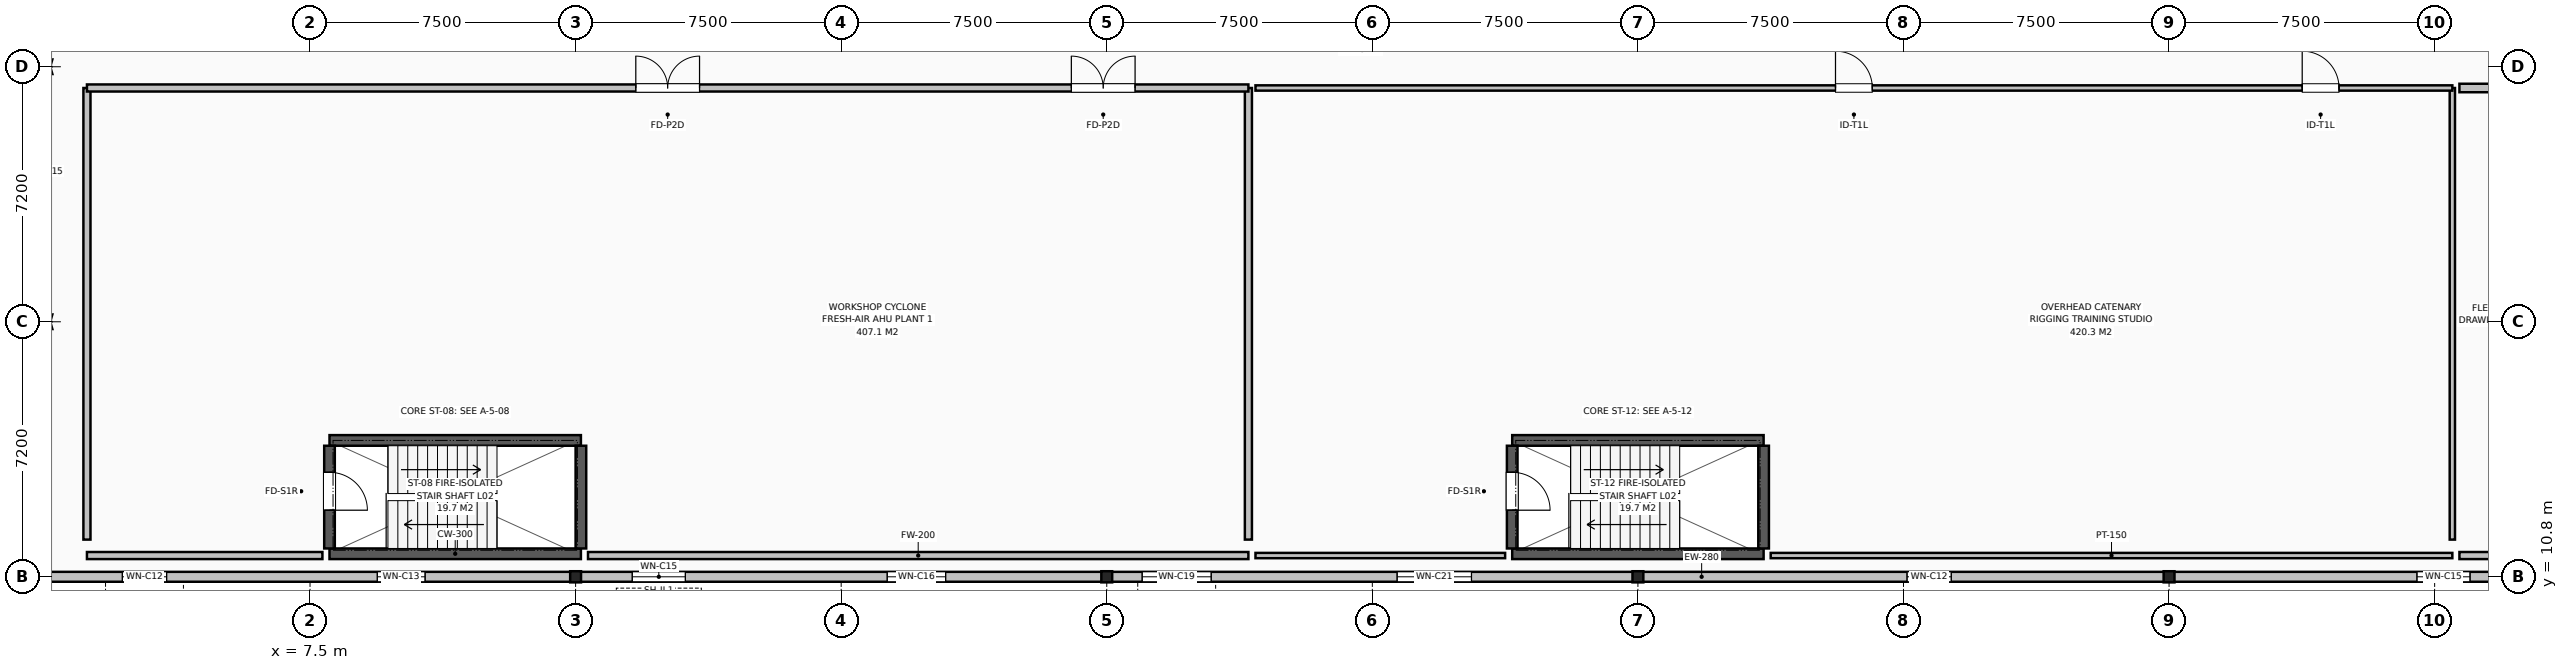
"""IFC4 building model, lengths in metres.
Left out: names, types, materials, properties, quantities, classifications, styles, units other than length and angle.
Written with IfcOpenShell. Run it as: python <this file> out.ifc"""

import sys

from ifc_helpers import new_model, si_unit, direction, frame, frame_2d, origin, origin_2d, place, context, subcontext, project, spatial, rectangle, i_section, extrude, element, fill, save


model = new_model("IFC4")
c1 = context("Model", 3, precision=1e-05, world=origin(), true_north=direction((0.0, 1.0)))
c2 = subcontext(c1, "Body", "Model", "MODEL_VIEW")
j1 = project(units=[si_unit("LENGTHUNIT", "METRE"), si_unit("PLANEANGLEUNIT", "RADIAN")], contexts=[c1])
p1 = place(None, origin())
s1 = spatial("IfcSite", under=j1, at=p1, CompositionType="ELEMENT")
p2 = place(p1, origin())
s2 = spatial("IfcBuilding", under=s1, at=p2, CompositionType="ELEMENT")
p3 = place(p2, frame((0.0, 0.0, 9.0)))
s3 = spatial("IfcBuildingStorey", under=s2, at=p3, CompositionType="ELEMENT", Elevation=9.0)
for number, where, z_axis, x_axis in (
    (1, (15.0, 10.8, 0.0), (0.0, 0.0, 1.0), (1.0, 0.0, 0.0)),
    (2, (30.0, 10.8, 0.0), (0.0, 0.0, 1.0), (1.0, 0.0, 0.0)),
    (3, (45.0, 10.8, 0.0), (0.0, 0.0, 1.0), (1.0, 0.0, 0.0)),
    (4, (60.0, 10.8, 0.0), (0.0, 0.0, 1.0), (1.0, 0.0, 0.0)),
):
    element("IfcColumn", number, at=place(p3, frame(where, z_axis=z_axis, x_axis=x_axis)), inside=s3, PredefinedType="COLUMN", context=c2, shape_type="SweptSolid", body=[
        extrude(i_section(OverallWidth=0.307, OverallDepth=0.315, WebThickness=0.012, FlangeThickness=0.019, at=origin_2d()), origin(), (0.0, 0.0, 1.0), 4.2),
    ])
p4 = place(p3, frame((0.0, 10.8, 0.0), z_axis=(0.0, 0.0, 1.0), x_axis=(1.0, 0.0, 0.0)))
e5 = element("IfcWall", 5, at=p4, inside=s3, PredefinedType="SOLIDWALL", context=c2, shape_type="SweptSolid", body=[
    extrude(rectangle(XDim=93.6, YDim=0.28, at=frame_2d((46.8, 0.0))), origin(), (0.0, 0.0, 1.0), 3.058),
])
p5 = place(p4, frame((2.2, 0.0, 0.78)))
e6 = element("IfcOpeningElement", 6, at=p5, cuts=e5, PredefinedType="OPENING", context=c2, shape_type="SweptSolid", body=[
    extrude(rectangle(XDim=1.25, YDim=1.7, at=frame_2d((0.625, 0.85))), frame((0.0, 0.15, 0.0), z_axis=(0.0, -1.0, 0.0), x_axis=(1.0, 0.0, 0.0)), (0.0, 0.0, 1.0), 0.3),
])
p6 = place(p4, frame((9.4, 0.0, 0.78)))
e7 = element("IfcOpeningElement", 7, at=p6, cuts=e5, PredefinedType="OPENING", context=c2, shape_type="SweptSolid", body=[
    extrude(rectangle(XDim=1.35, YDim=1.75, at=frame_2d((0.675, 0.875))), frame((0.0, 0.15, 0.0), z_axis=(0.0, -1.0, 0.0), x_axis=(1.0, 0.0, 0.0)), (0.0, 0.0, 1.0), 0.3),
])
p7 = place(p4, frame((16.6, 0.0, 0.78)))
e8 = element("IfcOpeningElement", 8, at=p7, cuts=e5, PredefinedType="OPENING", context=c2, shape_type="SweptSolid", body=[
    extrude(rectangle(XDim=1.5, YDim=1.75, at=frame_2d((0.75, 0.875))), frame((0.0, 0.15, 0.0), z_axis=(0.0, -1.0, 0.0), x_axis=(1.0, 0.0, 0.0)), (0.0, 0.0, 1.0), 0.3),
])
p8 = place(p4, frame((23.8, 0.0, 0.78)))
e9 = element("IfcOpeningElement", 9, at=p8, cuts=e5, PredefinedType="OPENING", context=c2, shape_type="SweptSolid", body=[
    extrude(rectangle(XDim=1.65, YDim=1.8, at=frame_2d((0.825, 0.9))), frame((0.0, 0.15, 0.0), z_axis=(0.0, -1.0, 0.0), x_axis=(1.0, 0.0, 0.0)), (0.0, 0.0, 1.0), 0.3),
])
p9 = place(p4, frame((31.0, 0.0, 0.78)))
e10 = element("IfcOpeningElement", 10, at=p9, cuts=e5, PredefinedType="OPENING", context=c2, shape_type="SweptSolid", body=[
    extrude(rectangle(XDim=1.95, YDim=1.8, at=frame_2d((0.975, 0.9))), frame((0.0, 0.15, 0.0), z_axis=(0.0, -1.0, 0.0), x_axis=(1.0, 0.0, 0.0)), (0.0, 0.0, 1.0), 0.3),
])
p10 = place(p4, frame((38.2, 0.0, 0.78)))
e11 = element("IfcOpeningElement", 11, at=p10, cuts=e5, PredefinedType="OPENING", context=c2, shape_type="SweptSolid", body=[
    extrude(rectangle(XDim=2.1, YDim=1.8, at=frame_2d((1.05, 0.9))), frame((0.0, 0.15, 0.0), z_axis=(0.0, -1.0, 0.0), x_axis=(1.0, 0.0, 0.0)), (0.0, 0.0, 1.0), 0.3),
])
p11 = place(p4, frame((52.6, 0.0, 0.78)))
e12 = element("IfcOpeningElement", 12, at=p11, cuts=e5, PredefinedType="OPENING", context=c2, shape_type="SweptSolid", body=[
    extrude(rectangle(XDim=1.25, YDim=1.7, at=frame_2d((0.625, 0.85))), frame((0.0, 0.15, 0.0), z_axis=(0.0, -1.0, 0.0), x_axis=(1.0, 0.0, 0.0)), (0.0, 0.0, 1.0), 0.3),
])
p12 = place(p4, frame((67.0, 0.0, 0.78)))
e13 = element("IfcOpeningElement", 13, at=p12, cuts=e5, PredefinedType="OPENING", context=c2, shape_type="SweptSolid", body=[
    extrude(rectangle(XDim=1.5, YDim=1.75, at=frame_2d((0.75, 0.875))), frame((0.0, 0.15, 0.0), z_axis=(0.0, -1.0, 0.0), x_axis=(1.0, 0.0, 0.0)), (0.0, 0.0, 1.0), 0.3),
])
p13 = place(p4, frame((81.4, 0.0, 0.78)))
e14 = element("IfcOpeningElement", 14, at=p13, cuts=e5, PredefinedType="OPENING", context=c2, shape_type="SweptSolid", body=[
    extrude(rectangle(XDim=1.95, YDim=1.8, at=frame_2d((0.975, 0.9))), frame((0.0, 0.15, 0.0), z_axis=(0.0, -1.0, 0.0), x_axis=(1.0, 0.0, 0.0)), (0.0, 0.0, 1.0), 0.3),
])
for number, where, z_axis, x_axis in (
    (15, (8.05, 11.45, 0.0), (0.0, 0.0, 1.0), (1.0, 0.0, 0.0)),
    (16, (15.15, 14.65, 0.0), (0.0, 0.0, 1.0), (-1.0, 0.0, 0.0)),
):
    element("IfcWall", number, at=place(p3, frame(where, z_axis=z_axis, x_axis=x_axis)), inside=s3, PredefinedType="SHEAR", context=c2, shape_type="SweptSolid", body=[
        extrude(rectangle(XDim=7.1, YDim=0.3, at=frame_2d((3.55, 0.0))), origin(), (0.0, 0.0, 1.0), 3.45),
    ])
p14 = place(p3, frame((15.15, 11.6, 0.0), z_axis=(0.0, 0.0, 1.0), x_axis=(0.0, 1.0, 0.0)))
e17 = element("IfcWall", 17, at=p14, inside=s3, PredefinedType="SHEAR", context=c2, shape_type="SweptSolid", body=[
    extrude(rectangle(XDim=2.9, YDim=0.3, at=frame_2d((1.45, 0.0))), origin(), (0.0, 0.0, 1.0), 3.45),
])
p15 = place(p3, frame((8.05, 14.5, 0.0), z_axis=(0.0, 0.0, 1.0), x_axis=(0.0, -1.0, 0.0)))
e18 = element("IfcWall", 18, at=p15, inside=s3, PredefinedType="SHEAR", context=c2, shape_type="SweptSolid", body=[
    extrude(rectangle(XDim=2.9, YDim=0.3, at=frame_2d((1.45, 0.0))), origin(), (0.0, 0.0, 1.0), 3.45),
])
p16 = place(p15, frame((0.75, 0.0, 0.0)))
e19 = element("IfcOpeningElement", 19, at=p16, cuts=e18, PredefinedType="OPENING", context=c2, shape_type="SweptSolid", body=[
    extrude(rectangle(XDim=1.07, YDim=2.15, at=frame_2d((0.535, 1.075))), frame((0.0, 0.16, 0.0), z_axis=(0.0, -1.0, 0.0), x_axis=(1.0, 0.0, 0.0)), (0.0, 0.0, 1.0), 0.32),
])
for number, where, z_axis, x_axis in (
    (20, (41.45, 11.45, 0.0), (0.0, 0.0, 1.0), (1.0, 0.0, 0.0)),
    (21, (48.55, 14.65, 0.0), (0.0, 0.0, 1.0), (-1.0, 0.0, 0.0)),
):
    element("IfcWall", number, at=place(p3, frame(where, z_axis=z_axis, x_axis=x_axis)), inside=s3, PredefinedType="SHEAR", context=c2, shape_type="SweptSolid", body=[
        extrude(rectangle(XDim=7.1, YDim=0.3, at=frame_2d((3.55, 0.0))), origin(), (0.0, 0.0, 1.0), 3.45),
    ])
p17 = place(p3, frame((48.55, 11.6, 0.0), z_axis=(0.0, 0.0, 1.0), x_axis=(0.0, 1.0, 0.0)))
e22 = element("IfcWall", 22, at=p17, inside=s3, PredefinedType="SHEAR", context=c2, shape_type="SweptSolid", body=[
    extrude(rectangle(XDim=2.9, YDim=0.3, at=frame_2d((1.45, 0.0))), origin(), (0.0, 0.0, 1.0), 3.45),
])
p18 = place(p3, frame((41.45, 14.5, 0.0), z_axis=(0.0, 0.0, 1.0), x_axis=(0.0, -1.0, 0.0)))
e23 = element("IfcWall", 23, at=p18, inside=s3, PredefinedType="SHEAR", context=c2, shape_type="SweptSolid", body=[
    extrude(rectangle(XDim=2.9, YDim=0.3, at=frame_2d((1.45, 0.0))), origin(), (0.0, 0.0, 1.0), 3.45),
])
p19 = place(p18, frame((0.75, 0.0, 0.0)))
e24 = element("IfcOpeningElement", 24, at=p19, cuts=e23, PredefinedType="OPENING", context=c2, shape_type="SweptSolid", body=[
    extrude(rectangle(XDim=1.07, YDim=2.15, at=frame_2d((0.535, 1.075))), frame((0.0, 0.16, 0.0), z_axis=(0.0, -1.0, 0.0), x_axis=(1.0, 0.0, 0.0)), (0.0, 0.0, 1.0), 0.32),
])
p20 = place(p3, frame((34.0, 11.4, 0.0), z_axis=(0.0, 0.0, 1.0), x_axis=(-1.0, 0.0, 0.0)))
e25 = element("IfcWall", 25, at=p20, inside=s3, PredefinedType="SOLIDWALL", context=c2, shape_type="SweptSolid", body=[
    extrude(rectangle(XDim=18.65, YDim=0.2, at=frame_2d((9.325, 0.0))), origin(), (0.0, 0.0, 1.0), 3.287),
])
p21 = place(p3, frame((7.85, 11.4, 0.0), z_axis=(0.0, 0.0, 1.0), x_axis=(-1.0, 0.0, 0.0)))
e26 = element("IfcWall", 26, at=p21, inside=s3, PredefinedType="SOLIDWALL", context=c2, shape_type="SweptSolid", body=[
    extrude(rectangle(XDim=6.65, YDim=0.2, at=frame_2d((3.325, 0.0))), origin(), (0.0, 0.0, 1.0), 3.6),
])
for number, where, z_axis, x_axis in (
    (27, (34.0, 11.85, 0.0), (0.0, 0.0, 1.0), (0.0, 1.0, 0.0)),
    (28, (1.2, 24.6, 0.0), (0.0, 0.0, 1.0), (0.0, -1.0, 0.0)),
):
    element("IfcWall", number, at=place(p3, frame(where, z_axis=z_axis, x_axis=x_axis)), inside=s3, PredefinedType="SOLIDWALL", context=c2, shape_type="SweptSolid", body=[
        extrude(rectangle(XDim=12.75, YDim=0.2, at=frame_2d((6.375, 0.0))), origin(), (0.0, 0.0, 1.0), 3.6),
    ])
p22 = place(p3, frame((1.2, 24.6, 0.0), z_axis=(0.0, 0.0, 1.0), x_axis=(1.0, 0.0, 0.0)))
e29 = element("IfcWall", 29, at=p22, inside=s3, PredefinedType="SOLIDWALL", context=c2, shape_type="SweptSolid", body=[
    extrude(rectangle(XDim=32.8, YDim=0.2, at=frame_2d((16.4, 0.0))), origin(), (0.0, 0.0, 1.0), 3.287),
])
p23 = place(p22, frame((15.5, 0.0, 0.0)))
e30 = element("IfcOpeningElement", 30, at=p23, cuts=e29, PredefinedType="OPENING", context=c2, shape_type="SweptSolid", body=[
    extrude(rectangle(XDim=1.8, YDim=2.2, at=frame_2d((0.9, 1.1))), frame((0.0, 0.11, 0.0), z_axis=(0.0, -1.0, 0.0), x_axis=(1.0, 0.0, 0.0)), (0.0, 0.0, 1.0), 0.22),
])
p24 = place(p22, frame((27.8, 0.0, 0.0)))
e31 = element("IfcOpeningElement", 31, at=p24, cuts=e29, PredefinedType="OPENING", context=c2, shape_type="SweptSolid", body=[
    extrude(rectangle(XDim=1.8, YDim=2.2, at=frame_2d((0.9, 1.1))), frame((0.0, 0.11, 0.0), z_axis=(0.0, -1.0, 0.0), x_axis=(1.0, 0.0, 0.0)), (0.0, 0.0, 1.0), 0.22),
])
p25 = place(p3, frame((68.0, 11.4, 0.0), z_axis=(0.0, 0.0, 1.0), x_axis=(-1.0, 0.0, 0.0)))
e32 = element("IfcWall", 32, at=p25, inside=s3, PredefinedType="PARTITIONING", context=c2, shape_type="SweptSolid", body=[
    extrude(rectangle(XDim=19.25, YDim=0.15, at=frame_2d((9.625, 0.0))), origin(), (0.0, 0.0, 1.0), 3.235),
])
p26 = place(p3, frame((41.25, 11.4, 0.0), z_axis=(0.0, 0.0, 1.0), x_axis=(-1.0, 0.0, 0.0)))
e33 = element("IfcWall", 33, at=p26, inside=s3, PredefinedType="PARTITIONING", context=c2, shape_type="SweptSolid", body=[
    extrude(rectangle(XDim=7.05, YDim=0.15, at=frame_2d((3.525, 0.0))), origin(), (0.0, 0.0, 1.0), 3.6),
])
p27 = place(p3, frame((68.0, 11.85, 0.0), z_axis=(0.0, 0.0, 1.0), x_axis=(0.0, 1.0, 0.0)))
e34 = element("IfcWall", 34, at=p27, inside=s3, PredefinedType="PARTITIONING", context=c2, shape_type="SweptSolid", body=[
    extrude(rectangle(XDim=12.75, YDim=0.15, at=frame_2d((6.375, 0.0))), origin(), (0.0, 0.0, 1.0), 3.6),
])
p28 = place(p3, frame((34.2, 24.6, 0.0), z_axis=(0.0, 0.0, 1.0), x_axis=(1.0, 0.0, 0.0)))
e35 = element("IfcWall", 35, at=p28, inside=s3, PredefinedType="PARTITIONING", context=c2, shape_type="SweptSolid", body=[
    extrude(rectangle(XDim=33.8, YDim=0.15, at=frame_2d((16.9, 0.0))), origin(), (0.0, 0.0, 1.0), 3.235),
])
p29 = place(p28, frame((16.38, 0.0, 0.0)))
e36 = element("IfcOpeningElement", 36, at=p29, cuts=e35, PredefinedType="OPENING", context=c2, shape_type="SweptSolid", body=[
    extrude(rectangle(XDim=1.04, YDim=2.15, at=frame_2d((0.52, 1.075))), frame((0.0, 0.085, 0.0), z_axis=(0.0, -1.0, 0.0), x_axis=(1.0, 0.0, 0.0)), (0.0, 0.0, 1.0), 0.17),
])
p30 = place(p28, frame((29.56, 0.0, 0.0)))
e37 = element("IfcOpeningElement", 37, at=p30, cuts=e35, PredefinedType="OPENING", context=c2, shape_type="SweptSolid", body=[
    extrude(rectangle(XDim=1.04, YDim=2.15, at=frame_2d((0.52, 1.075))), frame((0.0, 0.085, 0.0), z_axis=(0.0, -1.0, 0.0), x_axis=(1.0, 0.0, 0.0)), (0.0, 0.0, 1.0), 0.17),
])
p31 = place(p3, frame((75.85, 11.4, 0.0), z_axis=(0.0, 0.0, 1.0), x_axis=(-1.0, 0.0, 0.0)))
e38 = element("IfcWall", 38, at=p31, inside=s3, PredefinedType="SOLIDWALL", context=c2, shape_type="SweptSolid", body=[
    extrude(rectangle(XDim=7.65, YDim=0.2, at=frame_2d((3.825, 0.0))), origin(), (0.0, 0.0, 1.0), 3.185),
])
p32 = place(p3, frame((68.2, 24.6, 0.0), z_axis=(0.0, 0.0, 1.0), x_axis=(1.0, 0.0, 0.0)))
e39 = element("IfcWall", 39, at=p32, inside=s3, PredefinedType="SOLIDWALL", context=c2, shape_type="SweptSolid", body=[
    extrude(rectangle(XDim=24.4, YDim=0.24, at=frame_2d((12.2, 0.0))), origin(), (0.0, 0.0, 1.0), 3.185),
])
p33 = place(p32, frame((11.4, 0.0, 0.0)))
e40 = element("IfcOpeningElement", 40, at=p33, cuts=e39, PredefinedType="OPENING", context=c2, shape_type="SweptSolid", body=[
    extrude(rectangle(XDim=1.6, YDim=2.15, at=frame_2d((0.8, 1.075))), frame((0.0, 0.13, 0.0), z_axis=(0.0, -1.0, 0.0), x_axis=(1.0, 0.0, 0.0)), (0.0, 0.0, 1.0), 0.26),
])
p34 = place(p5, origin())
e41 = element("IfcWindow", 41, at=p34, inside=s3, PartitioningType="SINGLE_PANEL", PredefinedType="WINDOW", context=c2, shape_type="SweptSolid", body=[
    extrude(rectangle(XDim=1.25, YDim=1.7, at=frame_2d((0.625, 0.85))), frame((0.0, 0.03, 0.0), z_axis=(0.0, -1.0, 0.0), x_axis=(1.0, 0.0, 0.0)), (0.0, 0.0, 1.0), 0.06),
])
fill(e6, e41)
p35 = place(p6, origin())
e42 = element("IfcWindow", 42, at=p35, inside=s3, PartitioningType="SINGLE_PANEL", PredefinedType="WINDOW", context=c2, shape_type="SweptSolid", body=[
    extrude(rectangle(XDim=1.35, YDim=1.75, at=frame_2d((0.675, 0.875))), frame((0.0, 0.03, 0.0), z_axis=(0.0, -1.0, 0.0), x_axis=(1.0, 0.0, 0.0)), (0.0, 0.0, 1.0), 0.06),
])
fill(e7, e42)
p36 = place(p7, origin())
e43 = element("IfcWindow", 43, at=p36, inside=s3, PartitioningType="SINGLE_PANEL", PredefinedType="WINDOW", context=c2, shape_type="SweptSolid", body=[
    extrude(rectangle(XDim=1.5, YDim=1.75, at=frame_2d((0.75, 0.875))), frame((0.0, 0.03, 0.0), z_axis=(0.0, -1.0, 0.0), x_axis=(1.0, 0.0, 0.0)), (0.0, 0.0, 1.0), 0.06),
])
fill(e8, e43)
p37 = place(p8, origin())
e44 = element("IfcWindow", 44, at=p37, inside=s3, PartitioningType="SINGLE_PANEL", PredefinedType="WINDOW", context=c2, shape_type="SweptSolid", body=[
    extrude(rectangle(XDim=1.65, YDim=1.8, at=frame_2d((0.825, 0.9))), frame((0.0, 0.03, 0.0), z_axis=(0.0, -1.0, 0.0), x_axis=(1.0, 0.0, 0.0)), (0.0, 0.0, 1.0), 0.06),
])
fill(e9, e44)
p38 = place(p9, origin())
e45 = element("IfcWindow", 45, at=p38, inside=s3, PartitioningType="SINGLE_PANEL", PredefinedType="WINDOW", context=c2, shape_type="SweptSolid", body=[
    extrude(rectangle(XDim=1.95, YDim=1.8, at=frame_2d((0.975, 0.9))), frame((0.0, 0.03, 0.0), z_axis=(0.0, -1.0, 0.0), x_axis=(1.0, 0.0, 0.0)), (0.0, 0.0, 1.0), 0.06),
])
fill(e10, e45)
p39 = place(p10, origin())
e46 = element("IfcWindow", 46, at=p39, inside=s3, PartitioningType="SINGLE_PANEL", PredefinedType="WINDOW", context=c2, shape_type="SweptSolid", body=[
    extrude(rectangle(XDim=2.1, YDim=1.8, at=frame_2d((1.05, 0.9))), frame((0.0, 0.03, 0.0), z_axis=(0.0, -1.0, 0.0), x_axis=(1.0, 0.0, 0.0)), (0.0, 0.0, 1.0), 0.06),
])
fill(e11, e46)
p40 = place(p11, origin())
e47 = element("IfcWindow", 47, at=p40, inside=s3, PartitioningType="SINGLE_PANEL", PredefinedType="WINDOW", context=c2, shape_type="SweptSolid", body=[
    extrude(rectangle(XDim=1.25, YDim=1.7, at=frame_2d((0.625, 0.85))), frame((0.0, 0.03, 0.0), z_axis=(0.0, -1.0, 0.0), x_axis=(1.0, 0.0, 0.0)), (0.0, 0.0, 1.0), 0.06),
])
fill(e12, e47)
p41 = place(p12, origin())
e48 = element("IfcWindow", 48, at=p41, inside=s3, PartitioningType="SINGLE_PANEL", PredefinedType="WINDOW", context=c2, shape_type="SweptSolid", body=[
    extrude(rectangle(XDim=1.5, YDim=1.75, at=frame_2d((0.75, 0.875))), frame((0.0, 0.03, 0.0), z_axis=(0.0, -1.0, 0.0), x_axis=(1.0, 0.0, 0.0)), (0.0, 0.0, 1.0), 0.06),
])
fill(e13, e48)
p42 = place(p16, origin())
e49 = element("IfcDoor", 49, at=p42, inside=s3, OperationType="SINGLE_SWING_RIGHT", PredefinedType="DOOR", context=c2, shape_type="SweptSolid", body=[
    extrude(rectangle(XDim=1.07, YDim=2.15, at=frame_2d((0.535, 1.075))), frame((0.0, 0.025, 0.0), z_axis=(0.0, -1.0, 0.0), x_axis=(1.0, 0.0, 0.0)), (0.0, 0.0, 1.0), 0.05),
])
fill(e19, e49)
p43 = place(p19, origin())
e50 = element("IfcDoor", 50, at=p43, inside=s3, OperationType="SINGLE_SWING_RIGHT", PredefinedType="DOOR", context=c2, shape_type="SweptSolid", body=[
    extrude(rectangle(XDim=1.07, YDim=2.15, at=frame_2d((0.535, 1.075))), frame((0.0, 0.025, 0.0), z_axis=(0.0, -1.0, 0.0), x_axis=(1.0, 0.0, 0.0)), (0.0, 0.0, 1.0), 0.05),
])
fill(e24, e50)
p44 = place(p23, origin())
e51 = element("IfcDoor", 51, at=p44, inside=s3, OperationType="DOUBLE_SWING_LEFT", PredefinedType="DOOR", context=c2, shape_type="SweptSolid", body=[
    extrude(rectangle(XDim=1.8, YDim=2.2, at=frame_2d((0.9, 1.1))), frame((0.0, 0.025, 0.0), z_axis=(0.0, -1.0, 0.0), x_axis=(1.0, 0.0, 0.0)), (0.0, 0.0, 1.0), 0.05),
])
fill(e30, e51)
p45 = place(p24, origin())
e52 = element("IfcDoor", 52, at=p45, inside=s3, OperationType="DOUBLE_SWING_LEFT", PredefinedType="DOOR", context=c2, shape_type="SweptSolid", body=[
    extrude(rectangle(XDim=1.8, YDim=2.2, at=frame_2d((0.9, 1.1))), frame((0.0, 0.025, 0.0), z_axis=(0.0, -1.0, 0.0), x_axis=(1.0, 0.0, 0.0)), (0.0, 0.0, 1.0), 0.05),
])
fill(e31, e52)
p46 = place(p29, origin())
e53 = element("IfcDoor", 53, at=p46, inside=s3, OperationType="SINGLE_SWING_LEFT", PredefinedType="DOOR", context=c2, shape_type="SweptSolid", body=[
    extrude(rectangle(XDim=1.04, YDim=2.15, at=frame_2d((0.52, 1.075))), frame((0.0, 0.025, 0.0), z_axis=(0.0, -1.0, 0.0), x_axis=(1.0, 0.0, 0.0)), (0.0, 0.0, 1.0), 0.05),
])
fill(e36, e53)
p47 = place(p30, origin())
e54 = element("IfcDoor", 54, at=p47, inside=s3, OperationType="SINGLE_SWING_LEFT", PredefinedType="DOOR", context=c2, shape_type="SweptSolid", body=[
    extrude(rectangle(XDim=1.04, YDim=2.15, at=frame_2d((0.52, 1.075))), frame((0.0, 0.025, 0.0), z_axis=(0.0, -1.0, 0.0), x_axis=(1.0, 0.0, 0.0)), (0.0, 0.0, 1.0), 0.05),
])
fill(e37, e54)
save(model, sys.argv[1])
